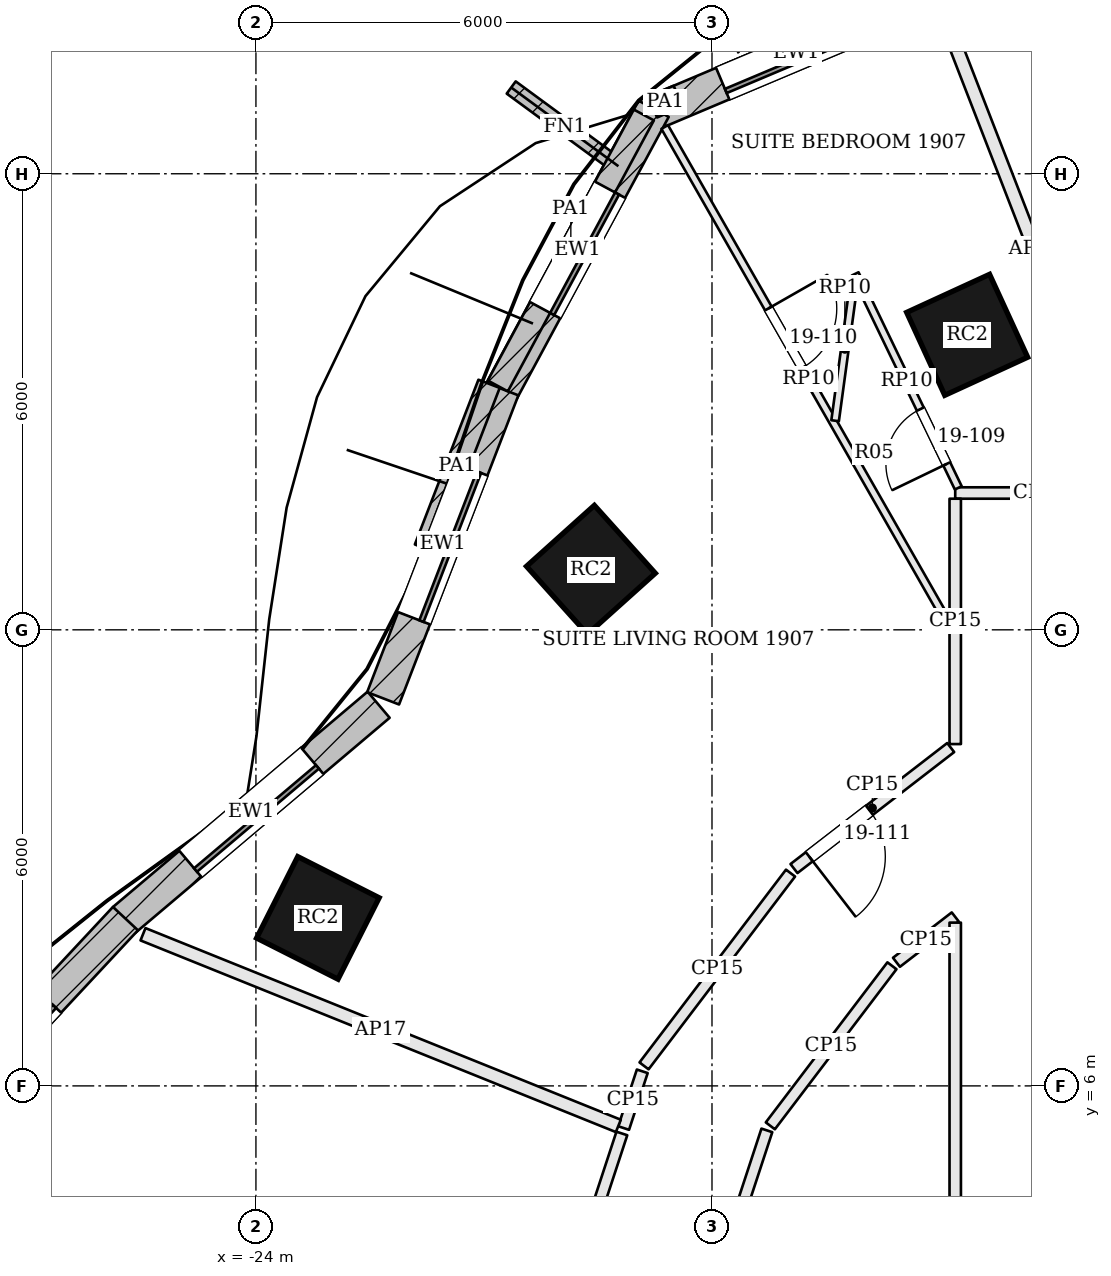
"""IFC4 building model, lengths in metres.
Left out: names, types, materials, properties, quantities, classifications, styles, units other than length and angle.
Written with IfcOpenShell. Run it as: python <this file> out.ifc"""

import sys

from ifc_helpers import new_model, si_unit, direction, frame, frame_2d, origin, origin_2d, place, context, subcontext, project, spatial, rectangle, extrude, element, fill, save


model = new_model("IFC4")
c1 = context("Model", 3, precision=1e-05, world=origin(), true_north=direction((0.0, 1.0)))
c2 = subcontext(c1, "Body", "Model", "MODEL_VIEW")
j1 = project(units=[si_unit("LENGTHUNIT", "METRE"), si_unit("PLANEANGLEUNIT", "RADIAN")], contexts=[c1])
p1 = place(None, origin())
s1 = spatial("IfcSite", under=j1, at=p1, CompositionType="ELEMENT")
p2 = place(p1, origin())
s2 = spatial("IfcBuilding", under=s1, at=p2, CompositionType="ELEMENT")
p3 = place(p2, frame((0.0, 0.0, 85.2)))
s3 = spatial("IfcBuildingStorey", under=s2, at=p3, CompositionType="ELEMENT", Elevation=85.2)
for number, where, z_axis, x_axis in (
    (1, (-14.643, 15.881, 0.0), (0.0, 0.0, 1.0), (-0.909, -0.417, 0.0)),
    (2, (-19.593, 12.79, 0.0), (0.0, 0.0, 1.0), (-0.744, -0.668, 0.0)),
    (3, (-23.185, 8.21, 0.0), (0.0, 0.0, 1.0), (-0.451, -0.893, 0.0)),
):
    element("IfcColumn", number, at=place(p3, frame(where, z_axis=z_axis, x_axis=x_axis)), inside=s3, PredefinedType="COLUMN", context=c2, shape_type="SweptSolid", body=[
        extrude(rectangle(XDim=1.2, YDim=1.2, at=origin_2d()), origin(), (0.0, 0.0, 1.0), 3.6),
    ])
p4 = place(p3, frame((-10.034, 19.259, 0.0), z_axis=(0.0, 0.0, 1.0), x_axis=(-0.974223567844, 0.225584662283, 0.0)))
e4 = element("IfcWall", 4, at=p4, inside=s3, PredefinedType="SOLIDWALL", context=c2, shape_type="SweptSolid", body=[
    extrude(rectangle(XDim=5.139, YDim=0.45, at=frame_2d((2.569, 0.0))), origin(), (0.0, 0.0, 1.0), 3.4),
])
p5 = place(p4, frame((1.519, 0.0, 0.9)))
e5 = element("IfcOpeningElement", 5, at=p5, cuts=e4, PredefinedType="OPENING", context=c2, shape_type="SweptSolid", body=[
    extrude(rectangle(XDim=2.1, YDim=2.0, at=frame_2d((1.05, 1.0))), frame((0.0, 0.235, 0.0), z_axis=(0.0, -1.0, 0.0), x_axis=(1.0, 0.0, 0.0)), (0.0, 0.0, 1.0), 0.47),
])
p6 = place(p3, frame((-14.906, 20.431, 0.0), z_axis=(0.0, 0.0, 1.0), x_axis=(-0.921435803521, -0.388530642279, 0.0)))
e6 = element("IfcWall", 6, at=p6, inside=s3, PredefinedType="SOLIDWALL", context=c2, shape_type="SweptSolid", body=[
    extrude(rectangle(XDim=4.309, YDim=0.45, at=frame_2d((2.154, 0.0))), origin(), (0.0, 0.0, 1.0), 3.4),
])
p7 = place(p6, frame((1.104, 0.0, 0.9)))
e7 = element("IfcOpeningElement", 7, at=p7, cuts=e6, PredefinedType="OPENING", context=c2, shape_type="SweptSolid", body=[
    extrude(rectangle(XDim=2.1, YDim=2.0, at=frame_2d((1.05, 1.0))), frame((0.0, 0.235, 0.0), z_axis=(0.0, -1.0, 0.0), x_axis=(1.0, 0.0, 0.0)), (0.0, 0.0, 1.0), 0.47),
])
p8 = place(p3, frame((-18.767, 18.854, 0.0), z_axis=(0.0, 0.0, 1.0), x_axis=(-0.474475888716, -0.880268499395, 0.0)))
e8 = element("IfcWall", 8, at=p8, inside=s3, PredefinedType="SOLIDWALL", context=c2, shape_type="SweptSolid", body=[
    extrude(rectangle(XDim=4.219, YDim=0.45, at=frame_2d((2.11, 0.0))), origin(), (0.0, 0.0, 1.0), 3.4),
])
p9 = place(p8, frame((1.21, 0.0, 0.9)))
e9 = element("IfcOpeningElement", 9, at=p9, cuts=e8, PredefinedType="OPENING", context=c2, shape_type="SweptSolid", body=[
    extrude(rectangle(XDim=1.8, YDim=2.0, at=frame_2d((0.9, 1.0))), frame((0.0, 0.235, 0.0), z_axis=(0.0, -1.0, 0.0), x_axis=(1.0, 0.0, 0.0)), (0.0, 0.0, 1.0), 0.47),
])
p10 = place(p3, frame((-20.757, 15.166, 0.0), z_axis=(0.0, 0.0, 1.0), x_axis=(-0.360067043581, -0.932926430179, 0.0)))
e10 = element("IfcWall", 10, at=p10, inside=s3, PredefinedType="SOLIDWALL", context=c2, shape_type="SweptSolid", body=[
    extrude(rectangle(XDim=4.36, YDim=0.45, at=frame_2d((2.18, 0.0))), origin(), (0.0, 0.0, 1.0), 3.4),
])
p11 = place(p10, frame((1.13, 0.0, 0.9)))
e11 = element("IfcOpeningElement", 11, at=p11, cuts=e10, PredefinedType="OPENING", context=c2, shape_type="SweptSolid", body=[
    extrude(rectangle(XDim=2.1, YDim=2.0, at=frame_2d((1.05, 1.0))), frame((0.0, 0.235, 0.0), z_axis=(0.0, -1.0, 0.0), x_axis=(1.0, 0.0, 0.0)), (0.0, 0.0, 1.0), 0.47),
])
p12 = place(p3, frame((-22.386, 11.014, 0.0), z_axis=(0.0, 0.0, 1.0), x_axis=(-0.763569952162, -0.645725118108, 0.0)))
e12 = element("IfcWall", 12, at=p12, inside=s3, PredefinedType="SOLIDWALL", context=c2, shape_type="SweptSolid", body=[
    extrude(rectangle(XDim=4.386, YDim=0.45, at=frame_2d((2.193, 0.0))), origin(), (0.0, 0.0, 1.0), 3.4),
])
p13 = place(p12, frame((1.143, 0.0, 0.9)))
e13 = element("IfcOpeningElement", 13, at=p13, cuts=e12, PredefinedType="OPENING", context=c2, shape_type="SweptSolid", body=[
    extrude(rectangle(XDim=2.1, YDim=2.0, at=frame_2d((1.05, 1.0))), frame((0.0, 0.235, 0.0), z_axis=(0.0, -1.0, 0.0), x_axis=(1.0, 0.0, 0.0)), (0.0, 0.0, 1.0), 0.47),
])
p14 = place(p3, frame((-25.717, 8.201, 0.0), z_axis=(0.0, 0.0, 1.0), x_axis=(-0.681990073025, -0.731361429319, 0.0)))
e14 = element("IfcWall", 14, at=p14, inside=s3, PredefinedType="SOLIDWALL", context=c2, shape_type="SweptSolid", body=[
    extrude(rectangle(XDim=5.064, YDim=0.45, at=frame_2d((2.532, 0.0))), origin(), (0.0, 0.0, 1.0), 3.4),
])
p15 = place(p14, frame((1.482, 0.0, 0.9)))
e15 = element("IfcOpeningElement", 15, at=p15, cuts=e14, PredefinedType="OPENING", context=c2, shape_type="SweptSolid", body=[
    extrude(rectangle(XDim=2.1, YDim=2.0, at=frame_2d((1.05, 1.0))), frame((0.0, 0.235, 0.0), z_axis=(0.0, -1.0, 0.0), x_axis=(1.0, 0.0, 0.0)), (0.0, 0.0, 1.0), 0.47),
])
p16 = place(p3, frame((-19.231, 18.099, 0.0), z_axis=(0.0, 0.0, 1.0), x_axis=(-0.806085538754, 0.591799040394, 0.0)))
e16 = element("IfcWall", 16, at=p16, inside=s3, PredefinedType="SOLIDWALL", context=c2, shape_type="SweptSolid", body=[
    extrude(rectangle(XDim=1.75, YDim=0.2, at=frame_2d((0.875, 0.0))), origin(), (0.0, 0.0, 1.0), 3.4),
])
p17 = place(p3, frame((-15.891, 20.097, 3.6), z_axis=(0.0, 0.0, 1.0), x_axis=(-0.921468908678, -0.388452121038, 0.0)))
e17 = element("IfcWall", 17, at=p17, inside=s3, PredefinedType="PARAPET", context=c2, shape_type="SweptSolid", body=[
    extrude(rectangle(XDim=2.099, YDim=0.3, at=frame_2d((1.05, 0.0))), origin(), (0.0, 0.0, 1.0), 1.1),
])
p18 = place(p3, frame((-18.446, 19.02, 3.6), z_axis=(0.0, 0.0, 1.0), x_axis=(-0.921356634102, -0.388718346358, 0.0)))
e18 = element("IfcWall", 18, at=p18, inside=s3, PredefinedType="PARAPET", context=c2, shape_type="SweptSolid", body=[
    extrude(rectangle(XDim=0.363, YDim=0.3, at=frame_2d((0.182, 0.0))), origin(), (0.0, 0.0, 1.0), 1.1),
])
p19 = place(p3, frame((-18.896, 18.773, 3.6), z_axis=(0.0, 0.0, 1.0), x_axis=(-0.474444905835, -0.880285198857, 0.0)))
e19 = element("IfcWall", 19, at=p19, inside=s3, PredefinedType="PARAPET", context=c2, shape_type="SweptSolid", body=[
    extrude(rectangle(XDim=4.05, YDim=0.3, at=frame_2d((2.025, 0.0))), origin(), (0.0, 0.0, 1.0), 1.1),
])
p20 = place(p3, frame((-20.933, 15.237, 3.6), z_axis=(0.0, 0.0, 1.0), x_axis=(-0.360021038217, -0.932944184848, 0.0)))
e20 = element("IfcWall", 20, at=p20, inside=s3, PredefinedType="PARAPET", context=c2, shape_type="SweptSolid", body=[
    extrude(rectangle(XDim=2.323, YDim=0.3, at=frame_2d((1.162, 0.0))), origin(), (0.0, 0.0, 1.0), 1.1),
])
p21 = place(p3, frame((-14.976, 20.153, 0.0), z_axis=(0.0, 0.0, 1.0), x_axis=(0.361720652029, -0.932286527788, 0.0)))
e21 = element("IfcWall", 21, at=p21, inside=s3, PredefinedType="PARTITIONING", context=c2, shape_type="SweptSolid", body=[
    extrude(rectangle(XDim=6.739, YDim=0.175, at=frame_2d((3.37, 0.0))), origin(), (0.0, 0.0, 1.0), 2.784),
])
p22 = place(p3, frame((-12.586, 13.8, 0.0), z_axis=(0.0, 0.0, 1.0), x_axis=(-1.0, 0.0, 0.0)))
e22 = element("IfcWall", 22, at=p22, inside=s3, PredefinedType="PARTITIONING", context=c2, shape_type="SweptSolid", body=[
    extrude(rectangle(XDim=2.214, YDim=0.15, at=frame_2d((1.107, 0.0))), origin(), (0.0, 0.0, 1.0), 2.784),
])
p23 = place(p3, frame((-14.8, 13.725, 0.0), z_axis=(0.0, 0.0, 1.0), x_axis=(0.0, -1.0, 0.0)))
e23 = element("IfcWall", 23, at=p23, inside=s3, PredefinedType="PARTITIONING", context=c2, shape_type="SweptSolid", body=[
    extrude(rectangle(XDim=3.228, YDim=0.15, at=frame_2d((1.614, 0.0))), origin(), (0.0, 0.0, 1.0), 2.784),
])
p24 = place(p3, frame((-14.86, 10.451, 0.0), z_axis=(0.0, 0.0, 1.0), x_axis=(-0.791542595332, -0.611113999001, 0.0)))
e24 = element("IfcWall", 24, at=p24, inside=s3, PredefinedType="PARTITIONING", context=c2, shape_type="SweptSolid", body=[
    extrude(rectangle(XDim=2.605, YDim=0.15, at=frame_2d((1.302, 0.0))), origin(), (0.0, 0.0, 1.0), 2.784),
])
p25 = place(p24, frame((1.35, 0.0, 0.0)))
e25 = element("IfcOpeningElement", 25, at=p25, cuts=e24, PredefinedType="OPENING", context=c2, shape_type="SweptSolid", body=[
    extrude(rectangle(XDim=1.0, YDim=2.1, at=frame_2d((0.5, 1.05))), frame((0.0, 0.085, 0.0), z_axis=(0.0, -1.0, 0.0), x_axis=(1.0, 0.0, 0.0)), (0.0, 0.0, 1.0), 0.17),
])
p26 = place(p3, frame((-16.967, 8.8, 0.0), z_axis=(0.0, 0.0, 1.0), x_axis=(-0.604991921991, -0.796231608469, 0.0)))
e26 = element("IfcWall", 26, at=p26, inside=s3, PredefinedType="PARTITIONING", context=c2, shape_type="SweptSolid", body=[
    extrude(rectangle(XDim=3.185, YDim=0.15, at=frame_2d((1.593, 0.0))), origin(), (0.0, 0.0, 1.0), 2.784),
])
p27 = place(p3, frame((-18.917, 6.192, 0.0), z_axis=(0.0, 0.0, 1.0), x_axis=(-0.312217378101, -0.950010688788, 0.0)))
e27 = element("IfcWall", 27, at=p27, inside=s3, PredefinedType="PARTITIONING", context=c2, shape_type="SweptSolid", body=[
    extrude(rectangle(XDim=0.786, YDim=0.15, at=frame_2d((0.393, 0.0))), origin(), (0.0, 0.0, 1.0), 2.784),
])
p28 = place(p3, frame((-25.486, 7.995, 0.0), z_axis=(0.0, 0.0, 1.0), x_axis=(0.927461928154, -0.373917600314, 0.0)))
e28 = element("IfcWall", 28, at=p28, inside=s3, PredefinedType="PARTITIONING", context=c2, shape_type="SweptSolid", body=[
    extrude(rectangle(XDim=6.743, YDim=0.175, at=frame_2d((3.371, 0.0))), origin(), (0.0, 0.0, 1.0), 2.784),
])
p29 = place(p3, frame((-19.186, 5.374, 0.0), z_axis=(0.0, 0.0, 1.0), x_axis=(-0.312120623237, -0.950042481445, 0.0)))
e29 = element("IfcWall", 29, at=p29, inside=s3, PredefinedType="PARTITIONING", context=c2, shape_type="SweptSolid", body=[
    extrude(rectangle(XDim=2.409, YDim=0.15, at=frame_2d((1.205, 0.0))), origin(), (0.0, 0.0, 1.0), 2.784),
])
p30 = place(p3, frame((-18.134, 2.809, 0.0), z_axis=(0.0, 0.0, 1.0), x_axis=(0.312005223814, 0.950080386237, 0.0)))
e30 = element("IfcWall", 30, at=p30, inside=s3, PredefinedType="PARTITIONING", context=c2, shape_type="SweptSolid", body=[
    extrude(rectangle(XDim=2.743, YDim=0.15, at=frame_2d((1.371, 0.0))), origin(), (0.0, 0.0, 1.0), 2.784),
])
p31 = place(p3, frame((-17.233, 5.475, 0.0), z_axis=(0.0, 0.0, 1.0), x_axis=(0.605024750549, 0.796206663639, 0.0)))
e31 = element("IfcWall", 31, at=p31, inside=s3, PredefinedType="PARTITIONING", context=c2, shape_type="SweptSolid", body=[
    extrude(rectangle(XDim=2.645, YDim=0.15, at=frame_2d((1.322, 0.0))), origin(), (0.0, 0.0, 1.0), 2.784),
])
p32 = place(p3, frame((-15.573, 7.626, 0.0), z_axis=(0.0, 0.0, 1.0), x_axis=(0.791581834002, 0.611063171921, 0.0)))
e32 = element("IfcWall", 32, at=p32, inside=s3, PredefinedType="PARTITIONING", context=c2, shape_type="SweptSolid", body=[
    extrude(rectangle(XDim=0.977, YDim=0.15, at=frame_2d((0.488, 0.0))), origin(), (0.0, 0.0, 1.0), 2.784),
])
p33 = place(p3, frame((-14.8, 8.148, 0.0), z_axis=(0.0, 0.0, 1.0), x_axis=(0.0, -1.0, 0.0)))
e33 = element("IfcWall", 33, at=p33, inside=s3, PredefinedType="PARTITIONING", context=c2, shape_type="SweptSolid", body=[
    extrude(rectangle(XDim=12.948, YDim=0.15, at=frame_2d((6.474, 0.0))), origin(), (0.0, 0.0, 1.0), 2.784),
])
p34 = place(p33, frame((5.536, 0.0, 0.0)))
e34 = element("IfcOpeningElement", 34, at=p34, cuts=e33, PredefinedType="OPENING", context=c2, shape_type="SweptSolid", body=[
    extrude(rectangle(XDim=1.8, YDim=2.1, at=frame_2d((0.9, 1.05))), frame((0.0, 0.085, 0.0), z_axis=(0.0, -1.0, 0.0), x_axis=(1.0, 0.0, 0.0)), (0.0, 0.0, 1.0), 0.17),
])
p35 = place(p3, frame((-18.622, 18.615, 0.0), z_axis=(0.0, 0.0, 1.0), x_axis=(0.495932236656, -0.868361224748, 0.0)))
e35 = element("IfcWall", 35, at=p35, inside=s3, PredefinedType="PARTITIONING", context=c2, shape_type="SweptSolid", body=[
    extrude(rectangle(XDim=7.632, YDim=0.1, at=frame_2d((3.816, 0.0))), origin(), (0.0, 0.0, 1.0), 2.784),
])
p36 = place(p35, frame((2.75, 0.0, 0.0)))
e36 = element("IfcOpeningElement", 36, at=p36, cuts=e35, PredefinedType="OPENING", context=c2, shape_type="SweptSolid", body=[
    extrude(rectangle(XDim=0.9, YDim=2.4, at=frame_2d((0.45, 1.2))), frame((0.0, 0.06, 0.0), z_axis=(0.0, -1.0, 0.0), x_axis=(1.0, 0.0, 0.0)), (0.0, 0.0, 1.0), 0.12),
])
p37 = place(p3, frame((-14.76, 13.868, 0.0), z_axis=(0.0, 0.0, 1.0), x_axis=(-0.434322957958, 0.900757219338, 0.0)))
e37 = element("IfcWall", 37, at=p37, inside=s3, PredefinedType="PARTITIONING", context=c2, shape_type="SweptSolid", body=[
    extrude(rectangle(XDim=3.125, YDim=0.1, at=frame_2d((1.562, 0.0))), origin(), (0.0, 0.0, 1.0), 2.784),
])
p38 = place(p37, frame((0.35, 0.0, 0.0)))
e38 = element("IfcOpeningElement", 38, at=p38, cuts=e37, PredefinedType="OPENING", context=c2, shape_type="SweptSolid", body=[
    extrude(rectangle(XDim=0.8, YDim=2.1, at=frame_2d((0.4, 1.05))), frame((0.0, 0.06, 0.0), z_axis=(0.0, -1.0, 0.0), x_axis=(1.0, 0.0, 0.0)), (0.0, 0.0, 1.0), 0.12),
])
p39 = place(p3, frame((-16.124, 16.633, 0.0), z_axis=(0.0, 0.0, 1.0), x_axis=(-0.134975529172, -0.990848932242, 0.0)))
e39 = element("IfcWall", 39, at=p39, inside=s3, PredefinedType="PARTITIONING", context=c2, shape_type="SweptSolid", body=[
    extrude(rectangle(XDim=1.899, YDim=0.1, at=frame_2d((0.95, 0.0))), origin(), (0.0, 0.0, 1.0), 2.784),
])
p40 = place(p7, origin())
e40 = element("IfcWindow", 40, at=p40, inside=s3, PartitioningType="SINGLE_PANEL", PredefinedType="WINDOW", context=c2, shape_type="SweptSolid", body=[
    extrude(rectangle(XDim=2.1, YDim=2.0, at=frame_2d((1.05, 1.0))), frame((0.0, 0.135, 0.0), z_axis=(0.0, -1.0, 0.0), x_axis=(1.0, 0.0, 0.0)), (0.0, 0.0, 1.0), 0.06),
])
fill(e7, e40)
p41 = place(p9, origin())
e41 = element("IfcWindow", 41, at=p41, inside=s3, PartitioningType="SINGLE_PANEL", PredefinedType="WINDOW", context=c2, shape_type="SweptSolid", body=[
    extrude(rectangle(XDim=1.8, YDim=2.0, at=frame_2d((0.9, 1.0))), frame((0.0, 0.135, 0.0), z_axis=(0.0, -1.0, 0.0), x_axis=(1.0, 0.0, 0.0)), (0.0, 0.0, 1.0), 0.06),
])
fill(e9, e41)
p42 = place(p11, origin())
e42 = element("IfcWindow", 42, at=p42, inside=s3, PartitioningType="SINGLE_PANEL", PredefinedType="WINDOW", context=c2, shape_type="SweptSolid", body=[
    extrude(rectangle(XDim=2.1, YDim=2.0, at=frame_2d((1.05, 1.0))), frame((0.0, 0.135, 0.0), z_axis=(0.0, -1.0, 0.0), x_axis=(1.0, 0.0, 0.0)), (0.0, 0.0, 1.0), 0.06),
])
fill(e11, e42)
p43 = place(p13, origin())
e43 = element("IfcWindow", 43, at=p43, inside=s3, PartitioningType="SINGLE_PANEL", PredefinedType="WINDOW", context=c2, shape_type="SweptSolid", body=[
    extrude(rectangle(XDim=2.1, YDim=2.0, at=frame_2d((1.05, 1.0))), frame((0.0, 0.135, 0.0), z_axis=(0.0, -1.0, 0.0), x_axis=(1.0, 0.0, 0.0)), (0.0, 0.0, 1.0), 0.06),
])
fill(e13, e43)
p44 = place(p15, origin())
e44 = element("IfcWindow", 44, at=p44, inside=s3, PartitioningType="SINGLE_PANEL", PredefinedType="WINDOW", context=c2, shape_type="SweptSolid", body=[
    extrude(rectangle(XDim=2.1, YDim=2.0, at=frame_2d((1.05, 1.0))), frame((0.0, 0.135, 0.0), z_axis=(0.0, -1.0, 0.0), x_axis=(1.0, 0.0, 0.0)), (0.0, 0.0, 1.0), 0.06),
])
fill(e15, e44)
p45 = place(p38, origin())
e45 = element("IfcDoor", 45, at=p45, inside=s3, OperationType="SINGLE_SWING_LEFT", PredefinedType="DOOR", context=c2, shape_type="SweptSolid", body=[
    extrude(rectangle(XDim=0.8, YDim=2.1, at=frame_2d((0.4, 1.05))), frame((0.0, 0.025, 0.0), z_axis=(0.0, -1.0, 0.0), x_axis=(1.0, 0.0, 0.0)), (0.0, 0.0, 1.0), 0.05),
])
fill(e38, e45)
p46 = place(p36, origin())
e46 = element("IfcDoor", 46, at=p46, inside=s3, OperationType="SINGLE_SWING_LEFT", PredefinedType="DOOR", context=c2, shape_type="SweptSolid", body=[
    extrude(rectangle(XDim=0.9, YDim=2.4, at=frame_2d((0.45, 1.2))), frame((0.0, 0.025, 0.0), z_axis=(0.0, -1.0, 0.0), x_axis=(1.0, 0.0, 0.0)), (0.0, 0.0, 1.0), 0.05),
])
fill(e36, e46)
p47 = place(p25, origin())
e47 = element("IfcDoor", 47, at=p47, inside=s3, OperationType="SINGLE_SWING_RIGHT", PredefinedType="DOOR", context=c2, shape_type="SweptSolid", body=[
    extrude(rectangle(XDim=1.0, YDim=2.1, at=frame_2d((0.5, 1.05))), frame((0.0, 0.025, 0.0), z_axis=(0.0, -1.0, 0.0), x_axis=(1.0, 0.0, 0.0)), (0.0, 0.0, 1.0), 0.05),
])
fill(e25, e47)
save(model, sys.argv[1])
